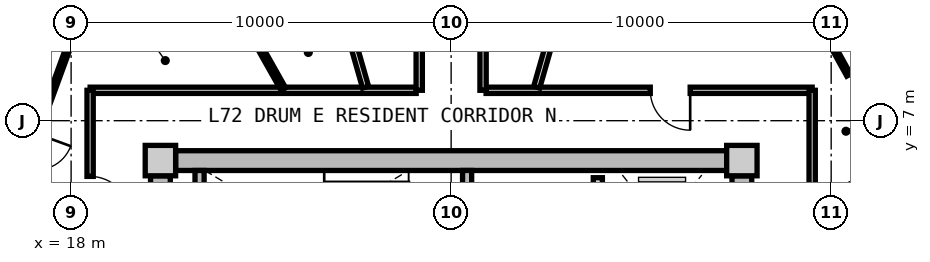
"""IFC4 building model, lengths in metres.
Left out: names, types, materials, properties, quantities, classifications, styles, units other than length and angle.
Written with IfcOpenShell. Run it as: python <this file> out.ifc"""

import sys

from ifc_helpers import new_model, si_unit, direction, frame, frame_2d, origin, origin_2d, place, context, subcontext, project, spatial, rectangle, extrude, source, transform, mapped, element, fill, save


model = new_model("IFC4")
c1 = context("Model", 3, precision=1e-05, world=origin(), true_north=direction((0.0, 1.0)))
c2 = subcontext(c1, "Body", "Model", "MODEL_VIEW")
j1 = project(units=[si_unit("LENGTHUNIT", "METRE"), si_unit("PLANEANGLEUNIT", "RADIAN")], contexts=[c1])
p1 = place(None, origin())
s1 = spatial("IfcSite", under=j1, at=p1, CompositionType="ELEMENT")
p2 = place(p1, origin())
s2 = spatial("IfcBuilding", under=s1, at=p2, CompositionType="ELEMENT")
p3 = place(p2, frame((0.0, 0.0, 232.2)))
s3 = spatial("IfcBuildingStorey", under=s2, at=p3, CompositionType="ELEMENT", Elevation=232.2)
m1 = source(origin(), c2, "Body", "SweptSolid", [
    extrude(rectangle(XDim=0.8, YDim=0.8, at=origin_2d()), origin(), (0.0, 0.0, 1.0), 3.05),
])
for number, where, z_axis, x_axis in (
    (1, (35.65, 5.95, 0.0), (0.0, 0.0, 1.0), (1.0, 0.0, 0.0)),
    (2, (20.35, 5.95, 0.0), (0.0, 0.0, 1.0), (1.0, 0.0, 0.0)),
):
    element("IfcColumn", number, at=place(p3, frame(where, z_axis=z_axis, x_axis=x_axis)), inside=s3, PredefinedType="COLUMN", context=c2, shape_type="MappedRepresentation", body=[
        mapped(m1, transform((0.0, 0.0, 0.0), x_axis=(1.0, 0.0, 0.0), y_axis=(0.0, 1.0, 0.0), z_axis=(0.0, 0.0, 1.0), scale=1.0)),
    ])
m2 = source(origin(), c2, "Body", "SweptSolid", [
    extrude(rectangle(XDim=14.5, YDim=0.52, at=frame_2d((7.25, 0.0))), origin(), (0.0, 0.0, 1.0), 2.81),
])
p4 = place(p3, frame((20.75, 5.95, 0.0), z_axis=(0.0, 0.0, 1.0), x_axis=(1.0, 0.0, 0.0)))
e3 = element("IfcWall", 3, at=p4, inside=s3, PredefinedType="SHEAR", context=c2, shape_type="MappedRepresentation", body=[
    mapped(m2, transform((0.0, 0.0, 0.0), x_axis=(1.0, 0.0, 0.0), y_axis=(0.0, 1.0, 0.0), z_axis=(0.0, 0.0, 1.0), scale=1.0)),
])
m3 = source(origin(), c2, "Body", "SweptSolid", [
    extrude(rectangle(XDim=11.1, YDim=0.52, at=frame_2d((5.55, 0.0))), origin(), (0.0, 0.0, 1.0), 2.81),
])
p5 = place(p3, frame((20.35, -5.55, 0.0), z_axis=(0.0, 0.0, 1.0), x_axis=(0.0, 1.0, 0.0)))
e4 = element("IfcWall", 4, at=p5, inside=s3, PredefinedType="SHEAR", context=c2, shape_type="MappedRepresentation", body=[
    mapped(m3, transform((0.0, 0.0, 0.0), x_axis=(1.0, 0.0, 0.0), y_axis=(0.0, 1.0, 0.0), z_axis=(0.0, 0.0, 1.0), scale=1.0)),
])
p6 = place(p5, frame((3.8, 0.0, 0.0)))
e5 = element("IfcOpeningElement", 5, at=p6, cuts=e4, PredefinedType="OPENING", context=c2, shape_type="SweptSolid", body=[
    extrude(rectangle(XDim=1.2, YDim=2.15, at=frame_2d((0.6, 1.075))), frame((0.0, 0.27, 0.0), z_axis=(0.0, -1.0, 0.0), x_axis=(1.0, 0.0, 0.0)), (0.0, 0.0, 1.0), 0.54),
])
p7 = place(p3, frame((35.65, 5.55, 0.0), z_axis=(0.0, 0.0, 1.0), x_axis=(0.0, -1.0, 0.0)))
e6 = element("IfcWall", 6, at=p7, inside=s3, PredefinedType="SHEAR", context=c2, shape_type="MappedRepresentation", body=[
    mapped(m3, transform((0.0, 0.0, 0.0), x_axis=(1.0, 0.0, 0.0), y_axis=(0.0, 1.0, 0.0), z_axis=(0.0, 0.0, 1.0), scale=1.0)),
])
p8 = place(p7, frame((5.65, 0.0, 0.0)))
e7 = element("IfcOpeningElement", 7, at=p8, cuts=e6, PredefinedType="OPENING", context=c2, shape_type="SweptSolid", body=[
    extrude(rectangle(XDim=1.2, YDim=2.15, at=frame_2d((0.6, 1.075))), frame((0.0, 0.27, 0.0), z_axis=(0.0, -1.0, 0.0), x_axis=(1.0, 0.0, 0.0)), (0.0, 0.0, 1.0), 0.54),
])
m4 = source(origin(), c2, "Body", "SweptSolid", [
    extrude(rectangle(XDim=3.24, YDim=0.24, at=frame_2d((1.62, 0.0))), origin(), (0.0, 0.0, 1.0), 2.81),
])
p9 = place(p3, frame((21.38, 2.45, 0.0), z_axis=(0.0, 0.0, 1.0), x_axis=(0.0, 1.0, 0.0)))
e8 = element("IfcWall", 8, at=p9, inside=s3, PredefinedType="PARTITIONING", context=c2, shape_type="MappedRepresentation", body=[
    mapped(m4, transform((0.0, 0.0, 0.0), x_axis=(1.0, 0.0, 0.0), y_axis=(0.0, 1.0, 0.0), z_axis=(0.0, 0.0, 1.0), scale=1.0)),
])
p10 = place(p3, frame((28.42, 2.45, 0.0), z_axis=(0.0, 0.0, 1.0), x_axis=(0.0, 1.0, 0.0)))
e9 = element("IfcWall", 9, at=p10, inside=s3, PredefinedType="PARTITIONING", context=c2, shape_type="MappedRepresentation", body=[
    mapped(m4, transform((0.0, 0.0, 0.0), x_axis=(1.0, 0.0, 0.0), y_axis=(0.0, 1.0, 0.0), z_axis=(0.0, 0.0, 1.0), scale=1.0)),
])
p11 = place(p10, frame((0.55, 0.0, 0.0)))
e10 = element("IfcOpeningElement", 10, at=p11, cuts=e9, PredefinedType="OPENING", context=c2, shape_type="SweptSolid", body=[
    extrude(rectangle(XDim=1.1, YDim=2.15, at=frame_2d((0.55, 1.075))), frame((0.0, 0.13, 0.0), z_axis=(0.0, -1.0, 0.0), x_axis=(1.0, 0.0, 0.0)), (0.0, 0.0, 1.0), 0.26),
])
m5 = source(origin(), c2, "Body", "SweptSolid", [
    extrude(rectangle(XDim=5.0, YDim=0.24, at=frame_2d((2.5, 0.0))), origin(), (0.0, 0.0, 1.0), 2.795),
])
p12 = place(p3, frame((31.86, 0.5, 0.0), z_axis=(0.0, 0.0, 1.0), x_axis=(0.0, 1.0, 0.0)))
e11 = element("IfcWall", 11, at=p12, inside=s3, PredefinedType="PARTITIONING", context=c2, shape_type="MappedRepresentation", body=[
    mapped(m5, transform((0.0, 0.0, 0.0), x_axis=(1.0, 0.0, 0.0), y_axis=(0.0, 1.0, 0.0), z_axis=(0.0, 0.0, 1.0), scale=1.0)),
])
p13 = place(p12, frame((3.05, 0.0, 0.0)))
e12 = element("IfcOpeningElement", 12, at=p13, cuts=e11, PredefinedType="OPENING", context=c2, shape_type="SweptSolid", body=[
    extrude(rectangle(XDim=1.3, YDim=2.2, at=frame_2d((0.65, 1.1))), frame((0.0, 0.13, 0.0), z_axis=(0.0, -1.0, 0.0), x_axis=(1.0, 0.0, 0.0)), (0.0, 0.0, 1.0), 0.26),
])
p14 = place(p12, frame((0.55, 0.0, 0.0)))
e13 = element("IfcOpeningElement", 13, at=p14, cuts=e11, PredefinedType="OPENING", context=c2, shape_type="SweptSolid", body=[
    extrude(rectangle(XDim=1.3, YDim=2.2, at=frame_2d((0.65, 1.1))), frame((0.0, 0.13, 0.0), z_axis=(0.0, -1.0, 0.0), x_axis=(1.0, 0.0, 0.0)), (0.0, 0.0, 1.0), 0.26),
])
m6 = source(origin(), c2, "Body", "SweptSolid", [
    extrude(rectangle(XDim=8.58, YDim=0.165, at=frame_2d((4.29, 0.0))), origin(), (0.0, 0.0, 1.0), 2.795),
])
p15 = place(p3, frame((18.5, 7.8, 0.0), z_axis=(0.0, 0.0, 1.0), x_axis=(1.0, 0.0, 0.0)))
e14 = element("IfcWall", 14, at=p15, inside=s3, PredefinedType="PARTITIONING", context=c2, shape_type="MappedRepresentation", body=[
    mapped(m6, transform((0.0, 0.0, 0.0), x_axis=(1.0, 0.0, 0.0), y_axis=(0.0, 1.0, 0.0), z_axis=(0.0, 0.0, 1.0), scale=1.0)),
])
p16 = place(p3, frame((28.92, 7.8, 0.0), z_axis=(0.0, 0.0, 1.0), x_axis=(1.0, 0.0, 0.0)))
e15 = element("IfcWall", 15, at=p16, inside=s3, PredefinedType="PARTITIONING", context=c2, shape_type="MappedRepresentation", body=[
    mapped(m6, transform((0.0, 0.0, 0.0), x_axis=(1.0, 0.0, 0.0), y_axis=(0.0, 1.0, 0.0), z_axis=(0.0, 0.0, 1.0), scale=1.0)),
])
p17 = place(p16, frame((4.32, 0.0, 0.0)))
e16 = element("IfcOpeningElement", 16, at=p17, cuts=e15, PredefinedType="OPENING", context=c2, shape_type="SweptSolid", body=[
    extrude(rectangle(XDim=1.05, YDim=2.15, at=frame_2d((0.525, 1.075))), frame((0.0, 0.093, 0.0), z_axis=(0.0, -1.0, 0.0), x_axis=(1.0, 0.0, 0.0)), (0.0, 0.0, 1.0), 0.185),
])
m7 = source(origin(), c2, "Body", "SweptSolid", [
    extrude(rectangle(XDim=6.88, YDim=0.165, at=frame_2d((3.44, 0.0))), origin(), (0.0, 0.0, 1.0), 2.795),
])
p18 = place(p3, frame((18.5, 0.92, 0.0), z_axis=(0.0, 0.0, 1.0), x_axis=(0.0, 1.0, 0.0)))
e17 = element("IfcWall", 17, at=p18, inside=s3, PredefinedType="PARTITIONING", context=c2, shape_type="MappedRepresentation", body=[
    mapped(m7, transform((0.0, 0.0, 0.0), x_axis=(1.0, 0.0, 0.0), y_axis=(0.0, 1.0, 0.0), z_axis=(0.0, 0.0, 1.0), scale=1.0)),
])
p19 = place(p18, frame((3.564, 0.0, 0.0)))
e18 = element("IfcOpeningElement", 18, at=p19, cuts=e17, PredefinedType="OPENING", context=c2, shape_type="SweptSolid", body=[
    extrude(rectangle(XDim=1.05, YDim=2.15, at=frame_2d((0.525, 1.075))), frame((0.0, 0.093, 0.0), z_axis=(0.0, -1.0, 0.0), x_axis=(1.0, 0.0, 0.0)), (0.0, 0.0, 1.0), 0.185),
])
p20 = place(p3, frame((37.5, 7.8, 0.0), z_axis=(0.0, 0.0, 1.0), x_axis=(0.0, -1.0, 0.0)))
e19 = element("IfcWall", 19, at=p20, inside=s3, PredefinedType="PARTITIONING", context=c2, shape_type="MappedRepresentation", body=[
    mapped(m7, transform((0.0, 0.0, 0.0), x_axis=(1.0, 0.0, 0.0), y_axis=(0.0, 1.0, 0.0), z_axis=(0.0, 0.0, 1.0), scale=1.0)),
])
m8 = source(origin(), c2, "Body", "SweptSolid", [
    extrude(rectangle(XDim=6.974, YDim=0.165, at=frame_2d((3.487, 0.0))), origin(), (0.0, 0.0, 1.0), 2.395),
])
for number, where, z_axis, x_axis in (
    (20, (30.251, 7.88, 0.0), (0.0, 0.0, 1.0), (0.275, 0.962, 0.0)),
    (21, (25.749, 7.88, 0.0), (0.0, 0.0, 1.0), (-0.275, 0.962, 0.0)),
):
    element("IfcWall", number, at=place(p3, frame(where, z_axis=z_axis, x_axis=x_axis)), inside=s3, PredefinedType="PARTITIONING", context=c2, shape_type="MappedRepresentation", body=[
        mapped(m8, transform((0.0, 0.0, 0.0), x_axis=(1.0, 0.0, 0.0), y_axis=(0.0, 1.0, 0.0), z_axis=(0.0, 0.0, 1.0), scale=1.0)),
    ])
m9 = source(origin(), c2, "Body", "SweptSolid", [
    extrude(rectangle(XDim=6.835, YDim=0.165, at=frame_2d((3.418, 0.0))), origin(), (0.0, 0.0, 1.0), 2.795),
])
p21 = place(p3, frame((27.16, 7.8, 0.0), z_axis=(0.0, 0.0, 1.0), x_axis=(0.0, 1.0, 0.0)))
e22 = element("IfcWall", 22, at=p21, inside=s3, PredefinedType="PARTITIONING", context=c2, shape_type="MappedRepresentation", body=[
    mapped(m9, transform((0.0, 0.0, 0.0), x_axis=(1.0, 0.0, 0.0), y_axis=(0.0, 1.0, 0.0), z_axis=(0.0, 0.0, 1.0), scale=1.0)),
])
p22 = place(p21, frame((2.943, 0.0, 0.0)))
e23 = element("IfcOpeningElement", 23, at=p22, cuts=e22, PredefinedType="OPENING", context=c2, shape_type="SweptSolid", body=[
    extrude(rectangle(XDim=0.95, YDim=2.1, at=frame_2d((0.475, 1.05))), frame((0.0, 0.093, 0.0), z_axis=(0.0, -1.0, 0.0), x_axis=(1.0, 0.0, 0.0)), (0.0, 0.0, 1.0), 0.185),
])
p23 = place(p3, frame((28.84, 14.635, 0.0), z_axis=(0.0, 0.0, 1.0), x_axis=(0.0, -1.0, 0.0)))
e24 = element("IfcWall", 24, at=p23, inside=s3, PredefinedType="PARTITIONING", context=c2, shape_type="MappedRepresentation", body=[
    mapped(m9, transform((0.0, 0.0, 0.0), x_axis=(1.0, 0.0, 0.0), y_axis=(0.0, 1.0, 0.0), z_axis=(0.0, 0.0, 1.0), scale=1.0)),
])
p24 = place(p23, frame((2.943, 0.0, 0.0)))
e25 = element("IfcOpeningElement", 25, at=p24, cuts=e24, PredefinedType="OPENING", context=c2, shape_type="SweptSolid", body=[
    extrude(rectangle(XDim=0.95, YDim=2.1, at=frame_2d((0.475, 1.05))), frame((0.0, 0.093, 0.0), z_axis=(0.0, -1.0, 0.0), x_axis=(1.0, 0.0, 0.0)), (0.0, 0.0, 1.0), 0.185),
])
m10 = source(origin(), c2, "Body", "SweptSolid", [
    extrude(rectangle(XDim=1.638, YDim=0.14, at=frame_2d((0.819, 0.0))), origin(), (0.0, 0.0, 1.0), 2.795),
])
p25 = place(p3, frame((37.53, 4.778, 0.0), z_axis=(0.0, 0.0, 1.0), x_axis=(0.893919977945, 0.448226586707, 0.0)))
e26 = element("IfcWall", 26, at=p25, inside=s3, PredefinedType="PARTITIONING", context=c2, shape_type="MappedRepresentation", body=[
    mapped(m10, transform((0.0, 0.0, 0.0), x_axis=(1.0, 0.0, 0.0), y_axis=(0.0, 1.0, 0.0), z_axis=(0.0, 0.0, 1.0), scale=1.0)),
])
m11 = source(origin(), c2, "Body", "SweptSolid", [
    extrude(rectangle(XDim=3.45, YDim=0.115, at=frame_2d((1.725, 0.0))), origin(), (0.0, 0.0, 1.0), 2.795),
])
p26 = place(p3, frame((39.525, 6.275, 0.0), z_axis=(0.0, 0.0, 1.0), x_axis=(-0.483659007882, 0.875256513312, 0.0)))
e27 = element("IfcWall", 27, at=p26, inside=s3, PredefinedType="PARTITIONING", context=c2, shape_type="MappedRepresentation", body=[
    mapped(m11, transform((0.0, 0.0, 0.0), x_axis=(1.0, 0.0, 0.0), y_axis=(0.0, 1.0, 0.0), z_axis=(0.0, 0.0, 1.0), scale=1.0)),
])
p27 = place(p26, frame((1.25, 0.0, 0.0)))
e28 = element("IfcOpeningElement", 28, at=p27, cuts=e27, PredefinedType="OPENING", context=c2, shape_type="SweptSolid", body=[
    extrude(rectangle(XDim=0.95, YDim=2.1, at=frame_2d((0.475, 1.05))), frame((0.0, 0.067, 0.0), z_axis=(0.0, -1.0, 0.0), x_axis=(1.0, 0.0, 0.0)), (0.0, 0.0, 1.0), 0.135),
])
m12 = source(origin(), c2, "Body", "SweptSolid", [
    extrude(rectangle(XDim=6.69, YDim=0.115, at=frame_2d((3.345, 0.0))), origin(), (0.0, 0.0, 1.0), 2.795),
])
p28 = place(p3, frame((18.083, 9.352, 0.0), z_axis=(0.0, 0.0, 1.0), x_axis=(-0.343693784919, -0.939081776102, 0.0)))
e29 = element("IfcWall", 29, at=p28, inside=s3, PredefinedType="PARTITIONING", context=c2, shape_type="MappedRepresentation", body=[
    mapped(m12, transform((0.0, 0.0, 0.0), x_axis=(1.0, 0.0, 0.0), y_axis=(0.0, 1.0, 0.0), z_axis=(0.0, 0.0, 1.0), scale=1.0)),
])
p29 = place(p28, frame((2.87, 0.0, 0.0)))
e30 = element("IfcOpeningElement", 30, at=p29, cuts=e29, PredefinedType="OPENING", context=c2, shape_type="SweptSolid", body=[
    extrude(rectangle(XDim=0.95, YDim=2.1, at=frame_2d((0.475, 1.05))), frame((0.0, 0.067, 0.0), z_axis=(0.0, -1.0, 0.0), x_axis=(1.0, 0.0, 0.0)), (0.0, 0.0, 1.0), 0.135),
])
m13 = source(origin(), c2, "Body", "SweptSolid", [
    extrude(rectangle(XDim=2.035, YDim=0.14, at=frame_2d((1.018, 0.0))), origin(), (0.0, 0.0, 1.0), 2.795),
])
p30 = place(p3, frame((23.585, 7.83, 0.0), z_axis=(0.0, 0.0, 1.0), x_axis=(-0.491092509169, 0.871107425888, 0.0)))
e31 = element("IfcWall", 31, at=p30, inside=s3, PredefinedType="PARTITIONING", context=c2, shape_type="MappedRepresentation", body=[
    mapped(m13, transform((0.0, 0.0, 0.0), x_axis=(1.0, 0.0, 0.0), y_axis=(0.0, 1.0, 0.0), z_axis=(0.0, 0.0, 1.0), scale=1.0)),
])
m14 = source(origin(), c2, "Body", "SweptSolid", [
    extrude(rectangle(XDim=1.05, YDim=2.15, at=frame_2d((0.525, 1.075))), frame((0.0, 0.025, 0.0), z_axis=(0.0, -1.0, 0.0), x_axis=(1.0, 0.0, 0.0)), (0.0, 0.0, 1.0), 0.05),
])
p31 = place(p17, frame((1.05, 0.0, 0.0), z_axis=(0.0, 0.0, 1.0), x_axis=(-1.0, 0.0, 0.0)))
e32 = element("IfcDoor", 32, at=p31, inside=s3, OperationType="SINGLE_SWING_LEFT", PredefinedType="DOOR", context=c2, shape_type="MappedRepresentation", body=[
    mapped(m14, transform((0.0, 0.0, 0.0), x_axis=(1.0, 0.0, 0.0), y_axis=(0.0, 1.0, 0.0), z_axis=(0.0, 0.0, 1.0), scale=1.0)),
])
fill(e16, e32)
m15 = source(origin(), c2, "Body", "SweptSolid", [
    extrude(rectangle(XDim=0.95, YDim=2.1, at=frame_2d((0.475, 1.05))), frame((0.0, 0.025, 0.0), z_axis=(0.0, -1.0, 0.0), x_axis=(1.0, 0.0, 0.0)), (0.0, 0.0, 1.0), 0.05),
])
p32 = place(p27, frame((0.95, 0.0, 0.0), z_axis=(0.0, 0.0, 1.0), x_axis=(-1.0, 0.0, 0.0)))
e33 = element("IfcDoor", 33, at=p32, inside=s3, OperationType="SINGLE_SWING_LEFT", PredefinedType="DOOR", context=c2, shape_type="MappedRepresentation", body=[
    mapped(m15, transform((0.0, 0.0, 0.0), x_axis=(1.0, 0.0, 0.0), y_axis=(0.0, 1.0, 0.0), z_axis=(0.0, 0.0, 1.0), scale=1.0)),
])
fill(e28, e33)
p33 = place(p19, frame((1.05, 0.0, 0.0), z_axis=(0.0, 0.0, 1.0), x_axis=(-1.0, 0.0, 0.0)))
e34 = element("IfcDoor", 34, at=p33, inside=s3, OperationType="SINGLE_SWING_RIGHT", PredefinedType="DOOR", context=c2, shape_type="MappedRepresentation", body=[
    mapped(m14, transform((0.0, 0.0, 0.0), x_axis=(1.0, 0.0, 0.0), y_axis=(0.0, 1.0, 0.0), z_axis=(0.0, 0.0, 1.0), scale=1.0)),
])
fill(e18, e34)
save(model, sys.argv[1])
